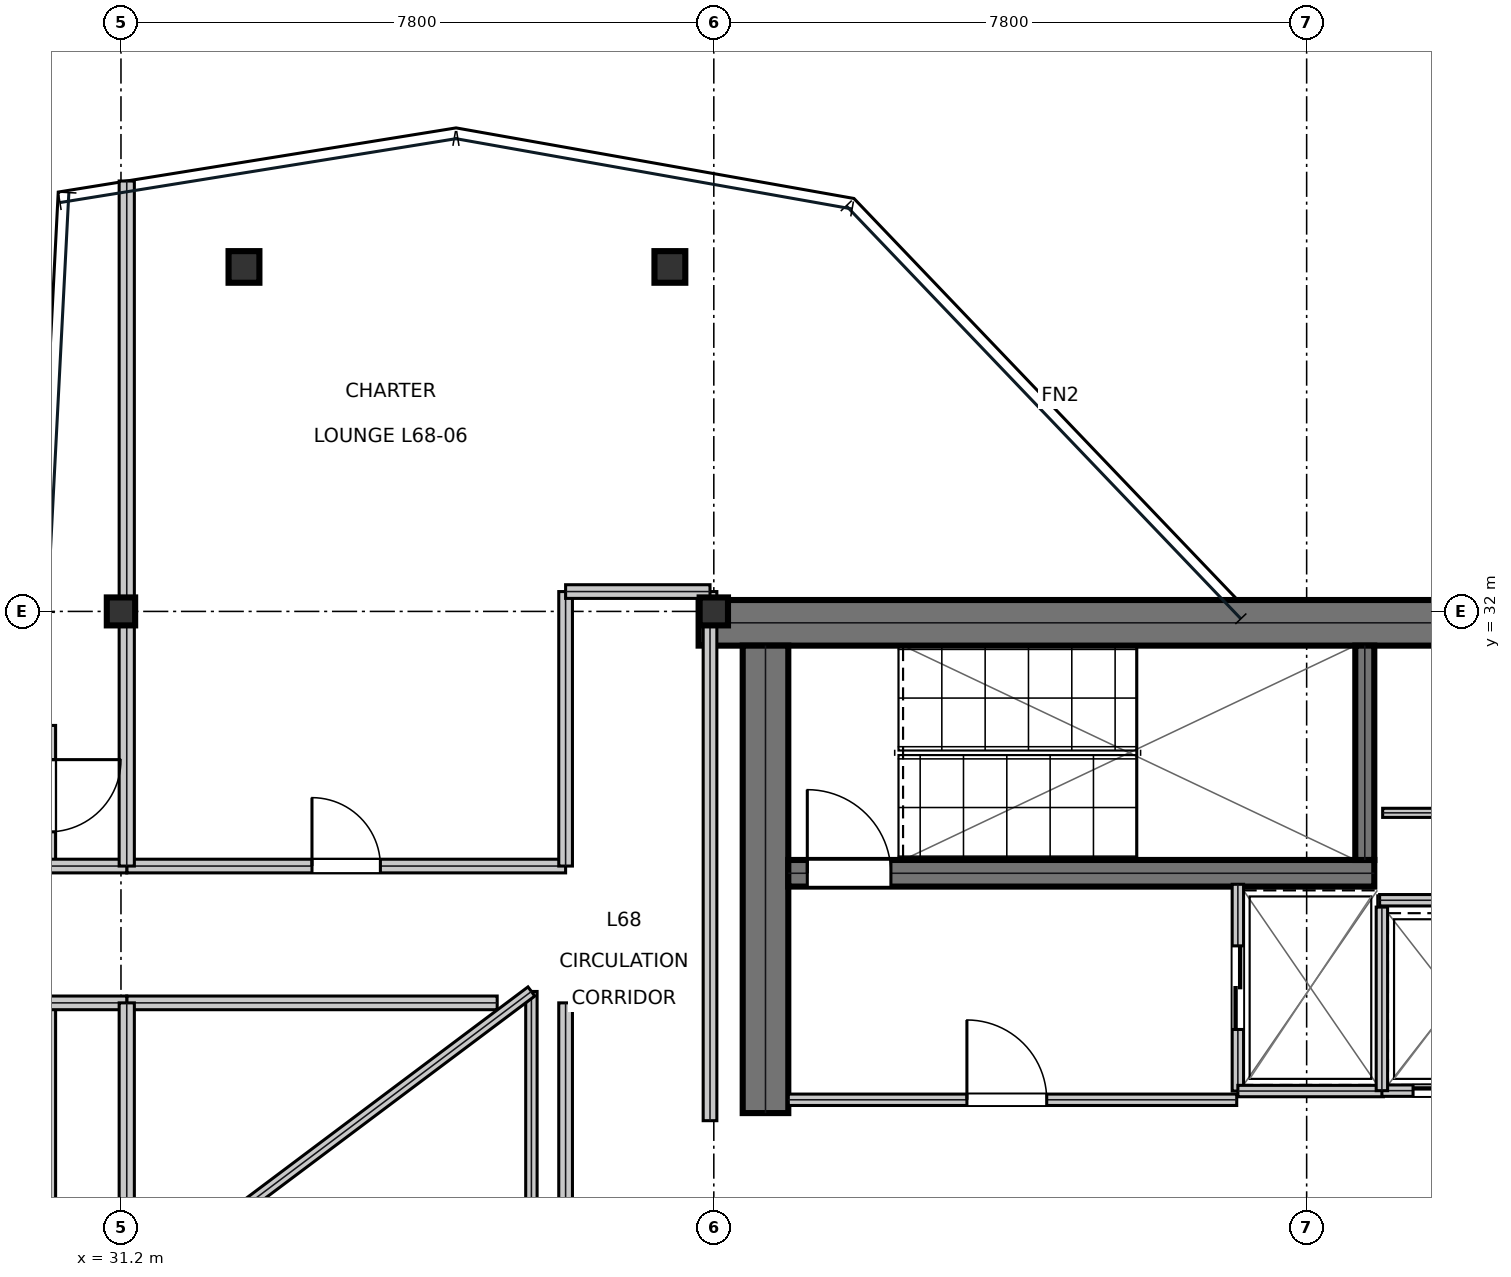
"""IFC4 building model, lengths in metres.
Left out: names, types, materials, properties, quantities, classifications, styles, units other than length and angle.
Written with IfcOpenShell. Run it as: python <this file> out.ifc"""

import sys

from ifc_helpers import new_model, si_unit, direction, frame, frame_2d, origin, origin_2d, place, context, subcontext, project, spatial, rectangle, i_section, extrude, element, fill, save


model = new_model("IFC4")
c1 = context("Model", 3, precision=1e-05, world=origin(), true_north=direction((0.0, 1.0)))
c2 = subcontext(c1, "Body", "Model", "MODEL_VIEW")
j1 = project(units=[si_unit("LENGTHUNIT", "METRE"), si_unit("PLANEANGLEUNIT", "RADIAN")], contexts=[c1])
p1 = place(None, origin())
s1 = spatial("IfcSite", under=j1, at=p1, CompositionType="ELEMENT")
p2 = place(p1, origin())
s2 = spatial("IfcBuilding", under=s1, at=p2, CompositionType="ELEMENT")
p3 = place(p2, frame((0.0, 0.0, 291.15)))
s3 = spatial("IfcBuildingStorey", under=s2, at=p3, CompositionType="ELEMENT", Elevation=291.15)
p4 = place(p3, frame((38.8, 31.85, 0.0), z_axis=(0.0, 0.0, 1.0), x_axis=(1.0, 0.0, 0.0)))
e1 = element("IfcWall", 1, at=p4, inside=s3, PredefinedType="SHEAR", context=c2, shape_type="SweptSolid", body=[
    extrude(rectangle(XDim=16.0, YDim=0.6, at=frame_2d((8.0, 0.0))), origin(), (0.0, 0.0, 1.0), 3.81),
])
p5 = place(p3, frame((39.68, 25.4, 0.0), z_axis=(0.0, 0.0, 1.0), x_axis=(0.0, 1.0, 0.0)))
e2 = element("IfcWall", 2, at=p5, inside=s3, PredefinedType="SHEAR", context=c2, shape_type="SweptSolid", body=[
    extrude(rectangle(XDim=6.15, YDim=0.6, at=frame_2d((3.075, 0.0))), origin(), (0.0, 0.0, 1.0), 3.81),
])
p6 = place(p3, frame((39.98, 28.555, 0.0), z_axis=(0.0, 0.0, 1.0), x_axis=(1.0, 0.0, 0.0)))
e3 = element("IfcWall", 3, at=p6, inside=s3, PredefinedType="SHEAR", context=c2, shape_type="SweptSolid", body=[
    extrude(rectangle(XDim=7.71, YDim=0.35, at=frame_2d((3.855, 0.0))), origin(), (0.0, 0.0, 1.0), 3.81),
])
p7 = place(p6, frame((0.25, 0.0, 0.0)))
e4 = element("IfcOpeningElement", 4, at=p7, cuts=e3, PredefinedType="OPENING", context=c2, shape_type="SweptSolid", body=[
    extrude(rectangle(XDim=1.1, YDim=2.15, at=frame_2d((0.55, 1.075))), frame((0.0, 0.185, 0.0), z_axis=(0.0, -1.0, 0.0), x_axis=(1.0, 0.0, 0.0)), (0.0, 0.0, 1.0), 0.37),
])
p8 = place(p3, frame((47.565, 28.73, 0.0), z_axis=(0.0, 0.0, 1.0), x_axis=(0.0, 1.0, 0.0)))
e5 = element("IfcWall", 5, at=p8, inside=s3, PredefinedType="SHEAR", context=c2, shape_type="SweptSolid", body=[
    extrude(rectangle(XDim=2.82, YDim=0.25, at=frame_2d((1.41, 0.0))), origin(), (0.0, 0.0, 1.0), 3.81),
])
for number, where, z_axis, x_axis in (
    (6, (31.2, 32.0, 0.0), (0.0, 0.0, 1.0), (1.0, 0.0, 0.0)),
    (7, (39.0, 32.0, 0.0), (0.0, 0.0, 1.0), (1.0, 0.0, 0.0)),
):
    element("IfcColumn", number, at=place(p3, frame(where, z_axis=z_axis, x_axis=x_axis)), inside=s3, PredefinedType="COLUMN", context=c2, shape_type="SweptSolid", body=[
        extrude(i_section(OverallWidth=0.373, OverallDepth=0.368, WebThickness=0.015, FlangeThickness=0.024, at=origin_2d()), origin(), (0.0, 0.0, 1.0), 4.044),
    ])
for number, where, z_axis, x_axis in (
    (8, (32.818, 36.532, 0.016), (0.0, 0.0, 1.0), (1.0, 0.0, 0.0)),
    (9, (38.422, 36.532, 0.016), (0.0, 0.0, 1.0), (1.0, 0.0, 0.0)),
):
    element("IfcColumn", number, at=place(p3, frame(where, z_axis=z_axis, x_axis=x_axis)), inside=s3, PredefinedType="COLUMN", context=c2, shape_type="SweptSolid", body=[
        extrude(i_section(OverallWidth=0.406, OverallDepth=0.416, WebThickness=0.03, FlangeThickness=0.048, at=origin_2d()), origin(), (0.0, 0.0, 1.0), 4.018),
    ])
p9 = place(p3, frame((39.98, 25.575, 0.0), z_axis=(0.0, 0.0, 1.0), x_axis=(1.0, 0.0, 0.0)))
e10 = element("IfcWall", 10, at=p9, inside=s3, PredefinedType="PARTITIONING", context=c2, shape_type="SweptSolid", body=[
    extrude(rectangle(XDim=5.9, YDim=0.15, at=frame_2d((2.95, 0.0))), origin(), (0.0, 0.0, 1.0), 3.81),
])
p10 = place(p9, frame((2.35, 0.0, 0.0)))
e11 = element("IfcOpeningElement", 11, at=p10, cuts=e10, PredefinedType="OPENING", context=c2, shape_type="SweptSolid", body=[
    extrude(rectangle(XDim=1.05, YDim=2.15, at=frame_2d((0.525, 1.075))), frame((0.0, 0.085, 0.0), z_axis=(0.0, -1.0, 0.0), x_axis=(1.0, 0.0, 0.0)), (0.0, 0.0, 1.0), 0.17),
])
p11 = place(p3, frame((45.895, 25.69, 0.0), z_axis=(0.0, 0.0, 1.0), x_axis=(0.0, 1.0, 0.0)))
e12 = element("IfcWall", 12, at=p11, inside=s3, PredefinedType="PARTITIONING", context=c2, shape_type="SweptSolid", body=[
    extrude(rectangle(XDim=2.72, YDim=0.15, at=frame_2d((1.36, 0.0))), origin(), (0.0, 0.0, 1.0), 3.81),
])
p12 = place(p11, frame((0.81, 0.0, 0.0)))
e13 = element("IfcOpeningElement", 13, at=p12, cuts=e12, PredefinedType="OPENING", context=c2, shape_type="SweptSolid", body=[
    extrude(rectangle(XDim=1.1, YDim=2.15, at=frame_2d((0.55, 1.075))), frame((0.0, 0.085, 0.0), z_axis=(0.0, -1.0, 0.0), x_axis=(1.0, 0.0, 0.0)), (0.0, 0.0, 1.0), 0.17),
])
p13 = place(p3, frame((45.895, 25.69, 0.0), z_axis=(0.0, 0.0, 1.0), x_axis=(1.0, 0.0, 0.0)))
e14 = element("IfcWall", 14, at=p13, inside=s3, PredefinedType="PARTITIONING", context=c2, shape_type="SweptSolid", body=[
    extrude(rectangle(XDim=1.915, YDim=0.15, at=frame_2d((0.958, 0.0))), origin(), (0.0, 0.0, 1.0), 3.81),
])
p14 = place(p3, frame((47.79, 25.695, 0.0), z_axis=(0.0, 0.0, 1.0), x_axis=(1.0, 0.0, 0.0)))
e15 = element("IfcWall", 15, at=p14, inside=s3, PredefinedType="PARTITIONING", context=c2, shape_type="SweptSolid", body=[
    extrude(rectangle(XDim=1.92, YDim=0.15, at=frame_2d((0.96, 0.0))), origin(), (0.0, 0.0, 1.0), 3.81),
])
p15 = place(p14, frame((0.41, 0.0, 0.0)))
e16 = element("IfcOpeningElement", 16, at=p15, cuts=e15, PredefinedType="OPENING", context=c2, shape_type="SweptSolid", body=[
    extrude(rectangle(XDim=1.1, YDim=2.15, at=frame_2d((0.55, 1.075))), frame((0.0, 0.085, 0.0), z_axis=(0.0, -1.0, 0.0), x_axis=(1.0, 0.0, 0.0)), (0.0, 0.0, 1.0), 0.17),
])
p16 = place(p3, frame((47.79, 25.695, 0.0), z_axis=(0.0, 0.0, 1.0), x_axis=(0.0, 1.0, 0.0)))
e17 = element("IfcWall", 17, at=p16, inside=s3, PredefinedType="PARTITIONING", context=c2, shape_type="SweptSolid", body=[
    extrude(rectangle(XDim=2.415, YDim=0.15, at=frame_2d((1.208, 0.0))), origin(), (0.0, 0.0, 1.0), 3.81),
])
p17 = place(p3, frame((47.76, 28.2, 0.0), z_axis=(0.0, 0.0, 1.0), x_axis=(1.0, 0.0, 0.0)))
e18 = element("IfcWall", 18, at=p17, inside=s3, PredefinedType="PARTITIONING", context=c2, shape_type="SweptSolid", body=[
    extrude(rectangle(XDim=2.04, YDim=0.15, at=frame_2d((1.02, 0.0))), origin(), (0.0, 0.0, 1.0), 3.81),
])
p18 = place(p3, frame((47.8, 29.35, 0.0), z_axis=(0.0, 0.0, 1.0), x_axis=(1.0, 0.0, 0.0)))
e19 = element("IfcWall", 19, at=p18, inside=s3, PredefinedType="PARTITIONING", context=c2, shape_type="SweptSolid", body=[
    extrude(rectangle(XDim=5.86, YDim=0.12, at=frame_2d((2.93, 0.0))), origin(), (0.0, 0.0, 1.0), 3.81),
])
p19 = place(p18, frame((2.6, 0.0, 0.0)))
e20 = element("IfcOpeningElement", 20, at=p19, cuts=e19, PredefinedType="OPENING", context=c2, shape_type="SweptSolid", body=[
    extrude(rectangle(XDim=0.85, YDim=2.15, at=frame_2d((0.425, 1.075))), frame((0.0, 0.07, 0.0), z_axis=(0.0, -1.0, 0.0), x_axis=(1.0, 0.0, 0.0)), (0.0, 0.0, 1.0), 0.14),
])
p20 = place(p3, frame((37.05, 15.739, 0.0), z_axis=(0.0, 0.0, 1.0), x_axis=(0.0, 1.0, 0.0)))
e21 = element("IfcWall", 21, at=p20, inside=s3, PredefinedType="SOLIDWALL", context=c2, shape_type="SweptSolid", body=[
    extrude(rectangle(XDim=11.111, YDim=0.18, at=frame_2d((5.556, 0.0))), origin(), (0.0, 0.0, 1.0), 3.27),
])
p21 = place(p20, frame((3.306, 0.0, 0.0)))
e22 = element("IfcOpeningElement", 22, at=p21, cuts=e21, PredefinedType="OPENING", context=c2, shape_type="SweptSolid", body=[
    extrude(rectangle(XDim=0.9, YDim=2.15, at=frame_2d((0.45, 1.075))), frame((0.0, 0.1, 0.0), z_axis=(0.0, -1.0, 0.0), x_axis=(1.0, 0.0, 0.0)), (0.0, 0.0, 1.0), 0.2),
])
p22 = place(p3, frame((30.25, 17.5, 0.0), z_axis=(0.0, 0.0, 1.0), x_axis=(0.0, 1.0, 0.0)))
e23 = element("IfcWall", 23, at=p22, inside=s3, PredefinedType="SOLIDWALL", context=c2, shape_type="SweptSolid", body=[
    extrude(rectangle(XDim=9.35, YDim=0.18, at=frame_2d((4.675, 0.0))), origin(), (0.0, 0.0, 1.0), 3.27),
])
p23 = place(p22, frame((4.045, 0.0, 0.0)))
e24 = element("IfcOpeningElement", 24, at=p23, cuts=e23, PredefinedType="OPENING", context=c2, shape_type="SweptSolid", body=[
    extrude(rectangle(XDim=0.9, YDim=2.15, at=frame_2d((0.45, 1.075))), frame((0.0, 0.1, 0.0), z_axis=(0.0, -1.0, 0.0), x_axis=(1.0, 0.0, 0.0)), (0.0, 0.0, 1.0), 0.2),
])
p24 = place(p3, frame((30.25, 28.65, 0.0), z_axis=(0.0, 0.0, 1.0), x_axis=(0.0, 1.0, 0.0)))
e25 = element("IfcWall", 25, at=p24, inside=s3, PredefinedType="SOLIDWALL", context=c2, shape_type="SweptSolid", body=[
    extrude(rectangle(XDim=1.85, YDim=0.18, at=frame_2d((0.925, 0.0))), origin(), (0.0, 0.0, 1.0), 3.81),
])
p25 = place(p24, frame((0.45, 0.0, 0.0)))
e26 = element("IfcOpeningElement", 26, at=p25, cuts=e25, PredefinedType="OPENING", context=c2, shape_type="SweptSolid", body=[
    extrude(rectangle(XDim=0.95, YDim=2.15, at=frame_2d((0.475, 1.075))), frame((0.0, 0.1, 0.0), z_axis=(0.0, -1.0, 0.0), x_axis=(1.0, 0.0, 0.0)), (0.0, 0.0, 1.0), 0.2),
])
p26 = place(p3, frame((31.276, 28.65, 0.0), z_axis=(0.0, 0.0, 1.0), x_axis=(1.0, 0.0, 0.0)))
e27 = element("IfcWall", 27, at=p26, inside=s3, PredefinedType="SOLIDWALL", context=c2, shape_type="SweptSolid", body=[
    extrude(rectangle(XDim=5.774, YDim=0.18, at=frame_2d((2.887, 0.0))), origin(), (0.0, 0.0, 1.0), 3.81),
])
p27 = place(p26, frame((2.437, 0.0, 0.0)))
e28 = element("IfcOpeningElement", 28, at=p27, cuts=e27, PredefinedType="OPENING", context=c2, shape_type="SweptSolid", body=[
    extrude(rectangle(XDim=0.9, YDim=2.15, at=frame_2d((0.45, 1.075))), frame((0.0, 0.1, 0.0), z_axis=(0.0, -1.0, 0.0), x_axis=(1.0, 0.0, 0.0)), (0.0, 0.0, 1.0), 0.2),
])
p28 = place(p3, frame((31.276, 26.85, 0.0), z_axis=(0.0, 0.0, 1.0), x_axis=(1.0, 0.0, 0.0)))
e29 = element("IfcWall", 29, at=p28, inside=s3, PredefinedType="SOLIDWALL", context=c2, shape_type="SweptSolid", body=[
    extrude(rectangle(XDim=4.874, YDim=0.18, at=frame_2d((2.437, 0.0))), origin(), (0.0, 0.0, 1.0), 3.81),
])
for number, where, z_axis, x_axis in (
    (30, (30.25, 26.85, 0.0), (0.0, 0.0, 1.0), (1.0, 0.0, 0.0)),
    (31, (30.25, 28.65, 0.0), (0.0, 0.0, 1.0), (1.0, 0.0, 0.0)),
):
    element("IfcWall", number, at=place(p3, frame(where, z_axis=z_axis, x_axis=x_axis)), inside=s3, PredefinedType="SOLIDWALL", context=c2, shape_type="SweptSolid", body=[
        extrude(rectangle(XDim=1.026, YDim=0.18, at=frame_2d((0.513, 0.0))), origin(), (0.0, 0.0, 1.0), 3.27),
    ])
p29 = place(p3, frame((38.95, 25.3, 0.0), z_axis=(0.0, 0.0, 1.0), x_axis=(0.0, 1.0, 0.0)))
e32 = element("IfcWall", 32, at=p29, inside=s3, PredefinedType="SOLIDWALL", context=c2, shape_type="SweptSolid", body=[
    extrude(rectangle(XDim=6.961, YDim=0.18, at=frame_2d((3.48, 0.0))), origin(), (0.0, 0.0, 1.0), 3.27),
])
p30 = place(p3, frame((37.05, 28.65, 0.0), z_axis=(0.0, 0.0, 1.0), x_axis=(0.0, 1.0, 0.0)))
e33 = element("IfcWall", 33, at=p30, inside=s3, PredefinedType="SOLIDWALL", context=c2, shape_type="SweptSolid", body=[
    extrude(rectangle(XDim=3.611, YDim=0.18, at=frame_2d((1.806, 0.0))), origin(), (0.0, 0.0, 1.0), 3.27),
])
p31 = place(p3, frame((37.05, 32.261, 0.0), z_axis=(0.0, 0.0, 1.0), x_axis=(1.0, 0.0, 0.0)))
e34 = element("IfcWall", 34, at=p31, inside=s3, PredefinedType="SOLIDWALL", context=c2, shape_type="SweptSolid", body=[
    extrude(rectangle(XDim=1.9, YDim=0.18, at=frame_2d((0.95, 0.0))), origin(), (0.0, 0.0, 1.0), 3.27),
])
p32 = place(p3, frame((31.276, 10.337, 0.0), z_axis=(0.0, 0.0, 1.0), x_axis=(0.0, 1.0, 0.0)))
e35 = element("IfcWall", 35, at=p32, inside=s3, PredefinedType="SOLIDWALL", context=c2, shape_type="SweptSolid", body=[
    extrude(rectangle(XDim=16.513, YDim=0.2, at=frame_2d((8.256, 0.0))), origin(), (0.0, 0.0, 1.0), 3.27),
])
p33 = place(p3, frame((31.276, 28.65, 0.0), z_axis=(0.0, 0.0, 1.0), x_axis=(0.0, 1.0, 0.0)))
e36 = element("IfcWall", 36, at=p33, inside=s3, PredefinedType="SOLIDWALL", context=c2, shape_type="SweptSolid", body=[
    extrude(rectangle(XDim=9.013, YDim=0.2, at=frame_2d((4.506, 0.0))), origin(), (0.0, 0.0, 1.0), 3.27),
])
p34 = place(p3, frame((36.6, 21.0, 0.0), z_axis=(0.0, 0.0, 1.0), x_axis=(0.0, 1.0, 0.0)))
e37 = element("IfcWall", 37, at=p34, inside=s3, PredefinedType="MOVABLE", context=c2, shape_type="SweptSolid", body=[
    extrude(rectangle(XDim=6.0, YDim=0.15, at=frame_2d((3.0, 0.0))), origin(), (0.0, 0.0, 1.0), 3.81),
])
p35 = place(p3, frame((36.6, 27.0, 0.0), z_axis=(0.0, 0.0, 1.0), x_axis=(-0.8, -0.6, 0.0)))
e38 = element("IfcWall", 38, at=p35, inside=s3, PredefinedType="MOVABLE", context=c2, shape_type="SweptSolid", body=[
    extrude(rectangle(XDim=5.0, YDim=0.15, at=frame_2d((2.5, 0.0))), origin(), (0.0, 0.0, 1.0), 3.81),
])
p36 = place(p10, origin())
e39 = element("IfcDoor", 39, at=p36, inside=s3, OperationType="SINGLE_SWING_LEFT", PredefinedType="DOOR", context=c2, shape_type="SweptSolid", body=[
    extrude(rectangle(XDim=1.05, YDim=2.15, at=frame_2d((0.525, 1.075))), frame((0.0, 0.025, 0.0), z_axis=(0.0, -1.0, 0.0), x_axis=(1.0, 0.0, 0.0)), (0.0, 0.0, 1.0), 0.05),
])
fill(e11, e39)
p37 = place(p12, frame((1.1, 0.0, 0.0), z_axis=(0.0, 0.0, 1.0), x_axis=(-1.0, 0.0, 0.0)))
e40 = element("IfcDoor", 40, at=p37, inside=s3, OperationType="DOUBLE_DOOR_SLIDING", PredefinedType="DOOR", context=c2, shape_type="SweptSolid", body=[
    extrude(rectangle(XDim=1.1, YDim=2.15, at=frame_2d((0.55, 1.075))), frame((0.0, 0.025, 0.0), z_axis=(0.0, -1.0, 0.0), x_axis=(1.0, 0.0, 0.0)), (0.0, 0.0, 1.0), 0.05),
])
fill(e13, e40)
p38 = place(p15, frame((1.1, 0.0, 0.0), z_axis=(0.0, 0.0, 1.0), x_axis=(-1.0, 0.0, 0.0)))
e41 = element("IfcDoor", 41, at=p38, inside=s3, OperationType="DOUBLE_DOOR_SLIDING", PredefinedType="DOOR", context=c2, shape_type="SweptSolid", body=[
    extrude(rectangle(XDim=1.1, YDim=2.15, at=frame_2d((0.55, 1.075))), frame((0.0, 0.025, 0.0), z_axis=(0.0, -1.0, 0.0), x_axis=(1.0, 0.0, 0.0)), (0.0, 0.0, 1.0), 0.05),
])
fill(e16, e41)
p39 = place(p27, origin())
e42 = element("IfcDoor", 42, at=p39, inside=s3, OperationType="SINGLE_SWING_LEFT", PredefinedType="DOOR", context=c2, shape_type="SweptSolid", body=[
    extrude(rectangle(XDim=0.9, YDim=2.15, at=frame_2d((0.45, 1.075))), frame((0.0, 0.025, 0.0), z_axis=(0.0, -1.0, 0.0), x_axis=(1.0, 0.0, 0.0)), (0.0, 0.0, 1.0), 0.05),
])
fill(e28, e42)
p40 = place(p7, origin())
e43 = element("IfcDoor", 43, at=p40, inside=s3, OperationType="SINGLE_SWING_LEFT", PredefinedType="DOOR", context=c2, shape_type="SweptSolid", body=[
    extrude(rectangle(XDim=1.1, YDim=2.15, at=frame_2d((0.55, 1.075))), frame((0.0, 0.025, 0.0), z_axis=(0.0, -1.0, 0.0), x_axis=(1.0, 0.0, 0.0)), (0.0, 0.0, 1.0), 0.05),
])
fill(e4, e43)
save(model, sys.argv[1])
